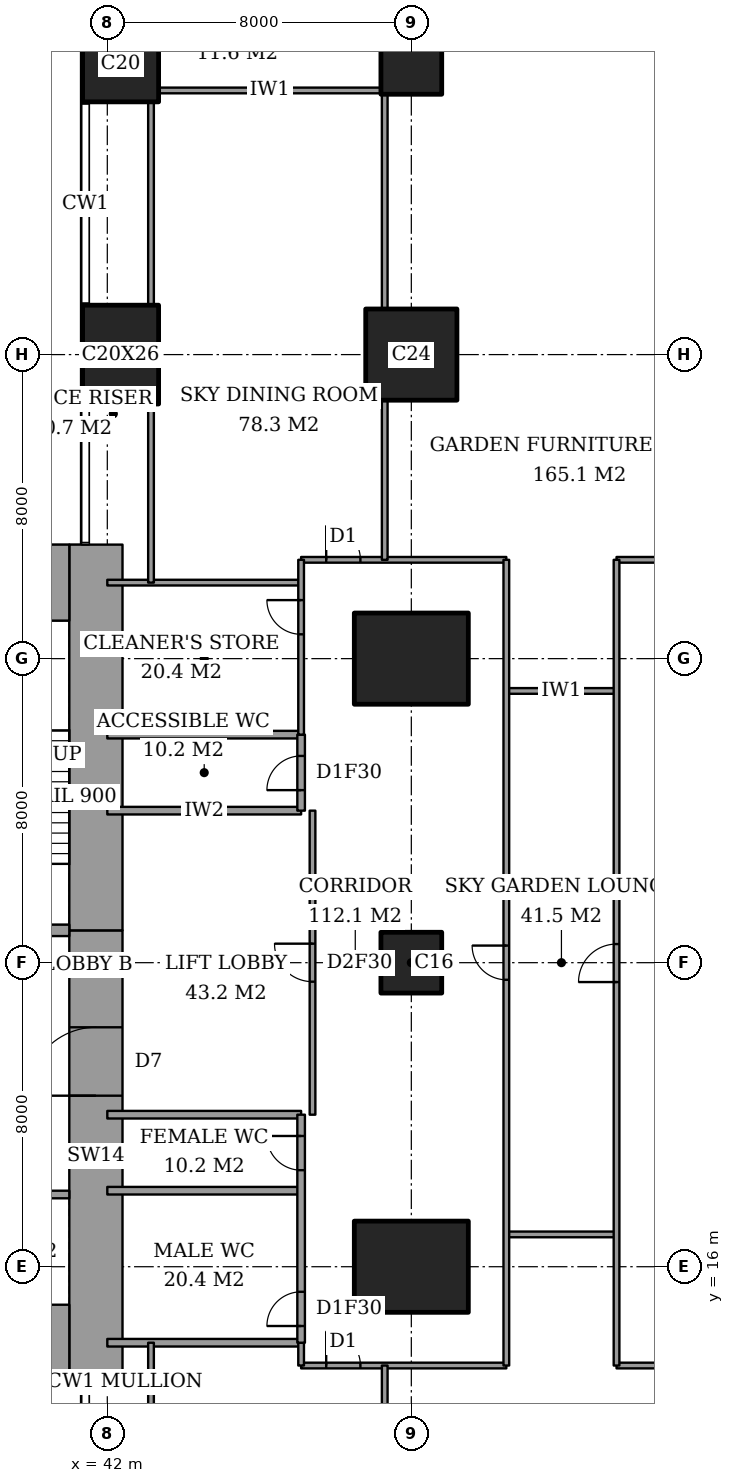
"""IFC4 building model, lengths in metres.
Left out: names, types, materials, properties, quantities, classifications, styles, units other than length and angle.
Written with IfcOpenShell. Run it as: python <this file> out.ifc"""

import sys

from ifc_helpers import new_model, si_unit, direction, frame, frame_2d, origin, origin_2d, place, context, subcontext, project, spatial, rectangle, extrude, element, fill, save


model = new_model("IFC4")
c1 = context("Model", 3, precision=1e-05, world=origin(), true_north=direction((0.0, 1.0)))
c2 = subcontext(c1, "Body", "Model", "MODEL_VIEW")
j1 = project(units=[si_unit("LENGTHUNIT", "METRE"), si_unit("PLANEANGLEUNIT", "RADIAN")], contexts=[c1])
p1 = place(None, origin())
s1 = spatial("IfcSite", under=j1, at=p1, CompositionType="ELEMENT")
p2 = place(p1, origin())
s2 = spatial("IfcBuilding", under=s1, at=p2, CompositionType="ELEMENT")
p3 = place(p2, frame((0.0, 0.0, 225.4)))
s3 = spatial("IfcBuildingStorey", under=s2, at=p3, CompositionType="ELEMENT", Elevation=225.4)
p4 = place(p3, frame((42.35, 40.0, 0.0), z_axis=(0.0, 0.0, 1.0), x_axis=(1.0, 0.0, 0.0)))
e1 = element("IfcColumn", 1, at=p4, inside=s3, PredefinedType="COLUMN", context=c2, shape_type="SweptSolid", body=[
    extrude(rectangle(XDim=2.0, YDim=2.6, at=origin_2d()), origin(), (0.0, 0.0, 1.0), 5.0),
])
p5 = place(p3, frame((42.35, 47.65, 0.0), z_axis=(0.0, 0.0, 1.0), x_axis=(1.0, 0.0, 0.0)))
e2 = element("IfcColumn", 2, at=p5, inside=s3, PredefinedType="COLUMN", context=c2, shape_type="SweptSolid", body=[
    extrude(rectangle(XDim=2.0, YDim=2.0, at=origin_2d()), origin(), (0.0, 0.0, 1.0), 5.0),
])
p6 = place(p3, frame((50.0, 16.0, 0.0), z_axis=(0.0, 0.0, 1.0), x_axis=(1.0, 0.0, 0.0)))
e3 = element("IfcColumn", 3, at=p6, inside=s3, PredefinedType="COLUMN", context=c2, shape_type="SweptSolid", body=[
    extrude(rectangle(XDim=3.0, YDim=2.4, at=origin_2d()), origin(), (0.0, 0.0, 1.0), 5.0),
])
p7 = place(p3, frame((50.0, 24.0, 0.0), z_axis=(0.0, 0.0, 1.0), x_axis=(1.0, 0.0, 0.0)))
e4 = element("IfcColumn", 4, at=p7, inside=s3, PredefinedType="COLUMN", context=c2, shape_type="SweptSolid", body=[
    extrude(rectangle(XDim=1.6, YDim=1.6, at=origin_2d()), origin(), (0.0, 0.0, 1.0), 5.0),
])
p8 = place(p3, frame((50.0, 32.0, 0.0), z_axis=(0.0, 0.0, 1.0), x_axis=(1.0, 0.0, 0.0)))
e5 = element("IfcColumn", 5, at=p8, inside=s3, PredefinedType="COLUMN", context=c2, shape_type="SweptSolid", body=[
    extrude(rectangle(XDim=3.0, YDim=2.4, at=origin_2d()), origin(), (0.0, 0.0, 1.0), 5.0),
])
p9 = place(p3, frame((50.0, 40.0, 0.0), z_axis=(0.0, 0.0, 1.0), x_axis=(1.0, 0.0, 0.0)))
e6 = element("IfcColumn", 6, at=p9, inside=s3, PredefinedType="COLUMN", context=c2, shape_type="SweptSolid", body=[
    extrude(rectangle(XDim=2.4, YDim=2.4, at=origin_2d()), origin(), (0.0, 0.0, 1.0), 5.0),
])
p10 = place(p3, frame((50.0, 47.65, 0.0), z_axis=(0.0, 0.0, 1.0), x_axis=(1.0, 0.0, 0.0)))
e7 = element("IfcColumn", 7, at=p10, inside=s3, PredefinedType="COLUMN", context=c2, shape_type="SweptSolid", body=[
    extrude(rectangle(XDim=1.6, YDim=1.6, at=origin_2d()), origin(), (0.0, 0.0, 1.0), 5.0),
])
for number, where, z_axis, x_axis in (
    (8, (37.85, 14.0, 0.0), (0.0, 0.0, 1.0), (1.0, 0.0, 0.0)),
    (9, (37.85, 34.0, 0.0), (0.0, 0.0, 1.0), (1.0, 0.0, 0.0)),
):
    element("IfcWall", number, at=place(p3, frame(where, z_axis=z_axis, x_axis=x_axis)), inside=s3, PredefinedType="SHEAR", context=c2, shape_type="SweptSolid", body=[
        extrude(rectangle(XDim=3.15, YDim=2.0, at=frame_2d((1.575, 0.0))), origin(), (0.0, 0.0, 1.0), 5.0),
    ])
p11 = place(p3, frame((41.7, 13.0, 0.0), z_axis=(0.0, 0.0, 1.0), x_axis=(0.0, 1.0, 0.0)))
e10 = element("IfcWall", 10, at=p11, inside=s3, PredefinedType="SHEAR", context=c2, shape_type="SweptSolid", body=[
    extrude(rectangle(XDim=11.85, YDim=1.4, at=frame_2d((5.925, 0.0))), origin(), (0.0, 0.0, 1.0), 5.0),
])
p12 = place(p11, frame((7.5, 0.0, 0.0)))
e11 = element("IfcOpeningElement", 11, at=p12, cuts=e10, PredefinedType="OPENING", context=c2, shape_type="SweptSolid", body=[
    extrude(rectangle(XDim=1.8, YDim=2.4, at=frame_2d((0.9, 1.2))), frame((0.0, 0.71, 0.0), z_axis=(0.0, -1.0, 0.0), x_axis=(1.0, 0.0, 0.0)), (0.0, 0.0, 1.0), 1.42),
])
p13 = place(p3, frame((41.7, 24.85, 0.0), z_axis=(0.0, 0.0, 1.0), x_axis=(0.0, 1.0, 0.0)))
e12 = element("IfcWall", 12, at=p13, inside=s3, PredefinedType="SHEAR", context=c2, shape_type="SweptSolid", body=[
    extrude(rectangle(XDim=10.15, YDim=1.4, at=frame_2d((5.075, 0.0))), origin(), (0.0, 0.0, 1.0), 5.0),
])
p14 = place(p3, frame((37.85, 24.85, 0.0), z_axis=(0.0, 0.0, 1.0), x_axis=(1.0, 0.0, 0.0)))
e13 = element("IfcWall", 13, at=p14, inside=s3, PredefinedType="SHEAR", context=c2, shape_type="SweptSolid", body=[
    extrude(rectangle(XDim=3.15, YDim=0.3, at=frame_2d((1.575, 0.0))), origin(), (0.0, 0.0, 1.0), 5.0),
])
p15 = place(p14, frame((0.65, 0.0, 0.0)))
e14 = element("IfcOpeningElement", 14, at=p15, cuts=e13, PredefinedType="OPENING", context=c2, shape_type="SweptSolid", body=[
    extrude(rectangle(XDim=1.6, YDim=2.1, at=frame_2d((0.8, 1.05))), frame((0.0, 0.16, 0.0), z_axis=(0.0, -1.0, 0.0), x_axis=(1.0, 0.0, 0.0)), (0.0, 0.0, 1.0), 0.32),
])
p16 = place(p3, frame((47.1, 13.4, 0.0), z_axis=(0.0, 0.0, 1.0), x_axis=(1.0, 0.0, 0.0)))
e15 = element("IfcWall", 15, at=p16, inside=s3, PredefinedType="PARTITIONING", context=c2, shape_type="SweptSolid", body=[
    extrude(rectangle(XDim=5.4, YDim=0.15, at=frame_2d((2.7, 0.0))), origin(), (0.0, 0.0, 1.0), 4.75),
])
p17 = place(p16, frame((0.66, 0.0, 0.0)))
e16 = element("IfcOpeningElement", 16, at=p17, cuts=e15, PredefinedType="OPENING", context=c2, shape_type="SweptSolid", body=[
    extrude(rectangle(XDim=0.9, YDim=2.1, at=frame_2d((0.45, 1.05))), frame((0.0, 0.085, 0.0), z_axis=(0.0, -1.0, 0.0), x_axis=(1.0, 0.0, 0.0)), (0.0, 0.0, 1.0), 0.17),
])
p18 = place(p3, frame((55.4, 13.4, 0.0), z_axis=(0.0, 0.0, 1.0), x_axis=(1.0, 0.0, 0.0)))
e17 = element("IfcWall", 17, at=p18, inside=s3, PredefinedType="PARTITIONING", context=c2, shape_type="SweptSolid", body=[
    extrude(rectangle(XDim=11.161, YDim=0.15, at=frame_2d((5.581, 0.0))), origin(), (0.0, 0.0, 1.0), 4.75),
])
p19 = place(p18, frame((6.88, 0.0, 0.0)))
e18 = element("IfcOpeningElement", 18, at=p19, cuts=e17, PredefinedType="OPENING", context=c2, shape_type="SweptSolid", body=[
    extrude(rectangle(XDim=0.9, YDim=2.1, at=frame_2d((0.45, 1.05))), frame((0.0, 0.085, 0.0), z_axis=(0.0, -1.0, 0.0), x_axis=(1.0, 0.0, 0.0)), (0.0, 0.0, 1.0), 0.17),
])
p20 = place(p3, frame((42.0, 14.0, 0.0), z_axis=(0.0, 0.0, 1.0), x_axis=(1.0, 0.0, 0.0)))
e19 = element("IfcWall", 19, at=p20, inside=s3, PredefinedType="PARTITIONING", context=c2, shape_type="SweptSolid", body=[
    extrude(rectangle(XDim=5.1, YDim=0.2, at=frame_2d((2.55, 0.0))), origin(), (0.0, 0.0, 1.0), 4.75),
])
p21 = place(p3, frame((52.5, 16.85, 0.0), z_axis=(0.0, 0.0, 1.0), x_axis=(1.0, 0.0, 0.0)))
e20 = element("IfcWall", 20, at=p21, inside=s3, PredefinedType="PARTITIONING", context=c2, shape_type="SweptSolid", body=[
    extrude(rectangle(XDim=2.9, YDim=0.15, at=frame_2d((1.45, 0.0))), origin(), (0.0, 0.0, 1.0), 4.75),
])
for number, where, z_axis, x_axis in (
    (21, (42.0, 18.0, 0.0), (0.0, 0.0, 1.0), (1.0, 0.0, 0.0)),
    (22, (42.0, 20.0, 0.0), (0.0, 0.0, 1.0), (1.0, 0.0, 0.0)),
    (23, (42.0, 28.0, 0.0), (0.0, 0.0, 1.0), (1.0, 0.0, 0.0)),
    (24, (42.0, 30.0, 0.0), (0.0, 0.0, 1.0), (1.0, 0.0, 0.0)),
):
    element("IfcWall", number, at=place(p3, frame(where, z_axis=z_axis, x_axis=x_axis)), inside=s3, PredefinedType="PARTITIONING", context=c2, shape_type="SweptSolid", body=[
        extrude(rectangle(XDim=5.1, YDim=0.2, at=frame_2d((2.55, 0.0))), origin(), (0.0, 0.0, 1.0), 4.75),
    ])
p22 = place(p3, frame((52.5, 31.15, 0.0), z_axis=(0.0, 0.0, 1.0), x_axis=(1.0, 0.0, 0.0)))
e25 = element("IfcWall", 25, at=p22, inside=s3, PredefinedType="PARTITIONING", context=c2, shape_type="SweptSolid", body=[
    extrude(rectangle(XDim=2.9, YDim=0.15, at=frame_2d((1.45, 0.0))), origin(), (0.0, 0.0, 1.0), 4.75),
])
p23 = place(p3, frame((42.0, 34.0, 0.0), z_axis=(0.0, 0.0, 1.0), x_axis=(1.0, 0.0, 0.0)))
e26 = element("IfcWall", 26, at=p23, inside=s3, PredefinedType="PARTITIONING", context=c2, shape_type="SweptSolid", body=[
    extrude(rectangle(XDim=5.1, YDim=0.15, at=frame_2d((2.55, 0.0))), origin(), (0.0, 0.0, 1.0), 4.75),
])
p24 = place(p3, frame((47.1, 34.6, 0.0), z_axis=(0.0, 0.0, 1.0), x_axis=(1.0, 0.0, 0.0)))
e27 = element("IfcWall", 27, at=p24, inside=s3, PredefinedType="PARTITIONING", context=c2, shape_type="SweptSolid", body=[
    extrude(rectangle(XDim=5.4, YDim=0.15, at=frame_2d((2.7, 0.0))), origin(), (0.0, 0.0, 1.0), 4.75),
])
p25 = place(p24, frame((0.66, 0.0, 0.0)))
e28 = element("IfcOpeningElement", 28, at=p25, cuts=e27, PredefinedType="OPENING", context=c2, shape_type="SweptSolid", body=[
    extrude(rectangle(XDim=0.9, YDim=2.1, at=frame_2d((0.45, 1.05))), frame((0.0, 0.085, 0.0), z_axis=(0.0, -1.0, 0.0), x_axis=(1.0, 0.0, 0.0)), (0.0, 0.0, 1.0), 0.17),
])
p26 = place(p3, frame((55.4, 34.6, 0.0), z_axis=(0.0, 0.0, 1.0), x_axis=(1.0, 0.0, 0.0)))
e29 = element("IfcWall", 29, at=p26, inside=s3, PredefinedType="PARTITIONING", context=c2, shape_type="SweptSolid", body=[
    extrude(rectangle(XDim=11.161, YDim=0.15, at=frame_2d((5.581, 0.0))), origin(), (0.0, 0.0, 1.0), 4.75),
])
p27 = place(p26, frame((6.88, 0.0, 0.0)))
e30 = element("IfcOpeningElement", 30, at=p27, cuts=e29, PredefinedType="OPENING", context=c2, shape_type="SweptSolid", body=[
    extrude(rectangle(XDim=0.9, YDim=2.1, at=frame_2d((0.45, 1.05))), frame((0.0, 0.085, 0.0), z_axis=(0.0, -1.0, 0.0), x_axis=(1.0, 0.0, 0.0)), (0.0, 0.0, 1.0), 0.17),
])
p28 = place(p3, frame((43.35, 46.95, 0.0), z_axis=(0.0, 0.0, 1.0), x_axis=(1.0, 0.0, 0.0)))
e31 = element("IfcWall", 31, at=p28, inside=s3, PredefinedType="PARTITIONING", context=c2, shape_type="SweptSolid", body=[
    extrude(rectangle(XDim=5.85, YDim=0.15, at=frame_2d((2.925, 0.0))), origin(), (0.0, 0.0, 1.0), 4.75),
])
for number, where, z_axis, x_axis in (
    (32, (43.15, 9.3, 0.0), (0.0, 0.0, 1.0), (0.0, 1.0, 0.0)),
    (33, (43.15, 34.0, 0.0), (0.0, 0.0, 1.0), (0.0, 1.0, 0.0)),
):
    element("IfcWall", number, at=place(p3, frame(where, z_axis=z_axis, x_axis=x_axis)), inside=s3, PredefinedType="PARTITIONING", context=c2, shape_type="SweptSolid", body=[
        extrude(rectangle(XDim=4.7, YDim=0.15, at=frame_2d((2.35, 0.0))), origin(), (0.0, 0.0, 1.0), 4.75),
    ])
p29 = place(p3, frame((43.15, 41.3, 0.0), z_axis=(0.0, 0.0, 1.0), x_axis=(0.0, 1.0, 0.0)))
e34 = element("IfcWall", 34, at=p29, inside=s3, PredefinedType="PARTITIONING", context=c2, shape_type="SweptSolid", body=[
    extrude(rectangle(XDim=5.35, YDim=0.15, at=frame_2d((2.675, 0.0))), origin(), (0.0, 0.0, 1.0), 4.75),
])
p30 = place(p3, frame((47.1, 14.0, 0.0), z_axis=(0.0, 0.0, 1.0), x_axis=(0.0, 1.0, 0.0)))
e35 = element("IfcWall", 35, at=p30, inside=s3, PredefinedType="PARTITIONING", context=c2, shape_type="SweptSolid", body=[
    extrude(rectangle(XDim=6.0, YDim=0.2, at=frame_2d((3.0, 0.0))), origin(), (0.0, 0.0, 1.0), 4.75),
])
p31 = place(p30, frame((0.44, 0.0, 0.0)))
e36 = element("IfcOpeningElement", 36, at=p31, cuts=e35, PredefinedType="OPENING", context=c2, shape_type="SweptSolid", body=[
    extrude(rectangle(XDim=0.9, YDim=2.1, at=frame_2d((0.45, 1.05))), frame((0.0, 0.11, 0.0), z_axis=(0.0, -1.0, 0.0), x_axis=(1.0, 0.0, 0.0)), (0.0, 0.0, 1.0), 0.22),
])
p32 = place(p30, frame((4.54, 0.0, 0.0)))
e37 = element("IfcOpeningElement", 37, at=p32, cuts=e35, PredefinedType="OPENING", context=c2, shape_type="SweptSolid", body=[
    extrude(rectangle(XDim=0.9, YDim=2.1, at=frame_2d((0.45, 1.05))), frame((0.0, 0.11, 0.0), z_axis=(0.0, -1.0, 0.0), x_axis=(1.0, 0.0, 0.0)), (0.0, 0.0, 1.0), 0.22),
])
p33 = place(p3, frame((47.1, 28.0, 0.0), z_axis=(0.0, 0.0, 1.0), x_axis=(0.0, 1.0, 0.0)))
e38 = element("IfcWall", 38, at=p33, inside=s3, PredefinedType="PARTITIONING", context=c2, shape_type="SweptSolid", body=[
    extrude(rectangle(XDim=2.0, YDim=0.2, at=frame_2d((1.0, 0.0))), origin(), (0.0, 0.0, 1.0), 4.75),
])
p34 = place(p33, frame((0.54, 0.0, 0.0)))
e39 = element("IfcOpeningElement", 39, at=p34, cuts=e38, PredefinedType="OPENING", context=c2, shape_type="SweptSolid", body=[
    extrude(rectangle(XDim=0.9, YDim=2.1, at=frame_2d((0.45, 1.05))), frame((0.0, 0.11, 0.0), z_axis=(0.0, -1.0, 0.0), x_axis=(1.0, 0.0, 0.0)), (0.0, 0.0, 1.0), 0.22),
])
p35 = place(p3, frame((47.1, 13.4, 0.0), z_axis=(0.0, 0.0, 1.0), x_axis=(0.0, 1.0, 0.0)))
e40 = element("IfcWall", 40, at=p35, inside=s3, PredefinedType="PARTITIONING", context=c2, shape_type="SweptSolid", body=[
    extrude(rectangle(XDim=0.6, YDim=0.15, at=frame_2d((0.3, 0.0))), origin(), (0.0, 0.0, 1.0), 4.75),
])
p36 = place(p3, frame((47.1, 30.0, 0.0), z_axis=(0.0, 0.0, 1.0), x_axis=(0.0, 1.0, 0.0)))
e41 = element("IfcWall", 41, at=p36, inside=s3, PredefinedType="PARTITIONING", context=c2, shape_type="SweptSolid", body=[
    extrude(rectangle(XDim=4.6, YDim=0.15, at=frame_2d((2.3, 0.0))), origin(), (0.0, 0.0, 1.0), 4.75),
])
p37 = place(p36, frame((2.64, 0.0, 0.0)))
e42 = element("IfcOpeningElement", 42, at=p37, cuts=e41, PredefinedType="OPENING", context=c2, shape_type="SweptSolid", body=[
    extrude(rectangle(XDim=0.9, YDim=2.1, at=frame_2d((0.45, 1.05))), frame((0.0, 0.085, 0.0), z_axis=(0.0, -1.0, 0.0), x_axis=(1.0, 0.0, 0.0)), (0.0, 0.0, 1.0), 0.17),
])
p38 = place(p3, frame((47.4, 20.0, 0.0), z_axis=(0.0, 0.0, 1.0), x_axis=(0.0, 1.0, 0.0)))
e43 = element("IfcWall", 43, at=p38, inside=s3, PredefinedType="PARTITIONING", context=c2, shape_type="SweptSolid", body=[
    extrude(rectangle(XDim=8.0, YDim=0.15, at=frame_2d((4.0, 0.0))), origin(), (0.0, 0.0, 1.0), 4.75),
])
p39 = place(p38, frame((3.5, 0.0, 0.0)))
e44 = element("IfcOpeningElement", 44, at=p39, cuts=e43, PredefinedType="OPENING", context=c2, shape_type="SweptSolid", body=[
    extrude(rectangle(XDim=1.0, YDim=2.1, at=frame_2d((0.5, 1.05))), frame((0.0, 0.085, 0.0), z_axis=(0.0, -1.0, 0.0), x_axis=(1.0, 0.0, 0.0)), (0.0, 0.0, 1.0), 0.17),
])
for number, where, z_axis, x_axis in (
    (45, (49.3, 9.2, 0.0), (0.0, 0.0, 1.0), (0.0, 1.0, 0.0)),
    (46, (49.3, 34.6, 0.0), (0.0, 0.0, 1.0), (0.0, 1.0, 0.0)),
):
    element("IfcWall", number, at=place(p3, frame(where, z_axis=z_axis, x_axis=x_axis)), inside=s3, PredefinedType="PARTITIONING", context=c2, shape_type="SweptSolid", body=[
        extrude(rectangle(XDim=4.2, YDim=0.15, at=frame_2d((2.1, 0.0))), origin(), (0.0, 0.0, 1.0), 4.75),
    ])
p40 = place(p3, frame((49.3, 41.2, 0.0), z_axis=(0.0, 0.0, 1.0), x_axis=(0.0, 1.0, 0.0)))
e47 = element("IfcWall", 47, at=p40, inside=s3, PredefinedType="PARTITIONING", context=c2, shape_type="SweptSolid", body=[
    extrude(rectangle(XDim=5.65, YDim=0.15, at=frame_2d((2.825, 0.0))), origin(), (0.0, 0.0, 1.0), 4.75),
])
p41 = place(p3, frame((52.5, 13.4, 0.0), z_axis=(0.0, 0.0, 1.0), x_axis=(0.0, 1.0, 0.0)))
e48 = element("IfcWall", 48, at=p41, inside=s3, PredefinedType="PARTITIONING", context=c2, shape_type="SweptSolid", body=[
    extrude(rectangle(XDim=21.2, YDim=0.15, at=frame_2d((10.6, 0.0))), origin(), (0.0, 0.0, 1.0), 4.75),
])
p42 = place(p41, frame((10.15, 0.0, 0.0)))
e49 = element("IfcOpeningElement", 49, at=p42, cuts=e48, PredefinedType="OPENING", context=c2, shape_type="SweptSolid", body=[
    extrude(rectangle(XDim=0.9, YDim=2.1, at=frame_2d((0.45, 1.05))), frame((0.0, 0.085, 0.0), z_axis=(0.0, -1.0, 0.0), x_axis=(1.0, 0.0, 0.0)), (0.0, 0.0, 1.0), 0.17),
])
p43 = place(p3, frame((55.4, 13.4, 0.0), z_axis=(0.0, 0.0, 1.0), x_axis=(0.0, 1.0, 0.0)))
e50 = element("IfcWall", 50, at=p43, inside=s3, PredefinedType="PARTITIONING", context=c2, shape_type="SweptSolid", body=[
    extrude(rectangle(XDim=21.2, YDim=0.15, at=frame_2d((10.6, 0.0))), origin(), (0.0, 0.0, 1.0), 4.75),
])
p44 = place(p43, frame((10.09, 0.0, 0.0)))
e51 = element("IfcOpeningElement", 51, at=p44, cuts=e50, PredefinedType="OPENING", context=c2, shape_type="SweptSolid", body=[
    extrude(rectangle(XDim=1.0, YDim=2.1, at=frame_2d((0.5, 1.05))), frame((0.0, 0.085, 0.0), z_axis=(0.0, -1.0, 0.0), x_axis=(1.0, 0.0, 0.0)), (0.0, 0.0, 1.0), 0.17),
])
p45 = place(p3, frame((28.3, 17.9, 0.0), z_axis=(0.0, 0.0, 1.0), x_axis=(1.0, 0.0, 0.0)))
e52 = element("IfcWall", 52, at=p45, inside=s3, PredefinedType="PARTITIONING", context=c2, shape_type="SweptSolid", body=[
    extrude(rectangle(XDim=12.7, YDim=0.2, at=frame_2d((6.35, 0.0))), origin(), (0.0, 0.0, 1.0), 5.0),
])
p46 = place(p45, frame((1.05, 0.0, 0.0)))
e53 = element("IfcOpeningElement", 53, at=p46, cuts=e52, PredefinedType="OPENING", context=c2, shape_type="SweptSolid", body=[
    extrude(rectangle(XDim=0.9, YDim=2.1, at=frame_2d((0.45, 1.05))), frame((0.0, 0.11, 0.0), z_axis=(0.0, -1.0, 0.0), x_axis=(1.0, 0.0, 0.0)), (0.0, 0.0, 1.0), 0.22),
])
p47 = place(p45, frame((7.4, 0.0, 0.0)))
e54 = element("IfcOpeningElement", 54, at=p47, cuts=e52, PredefinedType="OPENING", context=c2, shape_type="SweptSolid", body=[
    extrude(rectangle(XDim=1.0, YDim=2.1, at=frame_2d((0.5, 1.05))), frame((0.0, 0.11, 0.0), z_axis=(0.0, -1.0, 0.0), x_axis=(1.0, 0.0, 0.0)), (0.0, 0.0, 1.0), 0.22),
])
p48 = place(p45, frame((10.6, 0.0, 0.0)))
e55 = element("IfcOpeningElement", 55, at=p48, cuts=e52, PredefinedType="OPENING", context=c2, shape_type="SweptSolid", body=[
    extrude(rectangle(XDim=1.2, YDim=2.1, at=frame_2d((0.6, 1.05))), frame((0.0, 0.11, 0.0), z_axis=(0.0, -1.0, 0.0), x_axis=(1.0, 0.0, 0.0)), (0.0, 0.0, 1.0), 0.22),
])
p49 = place(p44, origin())
e56 = element("IfcDoor", 56, at=p49, inside=s3, OperationType="SINGLE_SWING_RIGHT", PredefinedType="DOOR", context=c2, shape_type="SweptSolid", body=[
    extrude(rectangle(XDim=1.0, YDim=2.1, at=frame_2d((0.5, 1.05))), frame((0.0, 0.025, 0.0), z_axis=(0.0, -1.0, 0.0), x_axis=(1.0, 0.0, 0.0)), (0.0, 0.0, 1.0), 0.05),
])
fill(e51, e56)
p50 = place(p42, origin())
e57 = element("IfcDoor", 57, at=p50, inside=s3, OperationType="SINGLE_SWING_LEFT", PredefinedType="DOOR", context=c2, shape_type="SweptSolid", body=[
    extrude(rectangle(XDim=0.9, YDim=2.1, at=frame_2d((0.45, 1.05))), frame((0.0, 0.025, 0.0), z_axis=(0.0, -1.0, 0.0), x_axis=(1.0, 0.0, 0.0)), (0.0, 0.0, 1.0), 0.05),
])
fill(e49, e57)
p51 = place(p39, origin())
e58 = element("IfcDoor", 58, at=p51, inside=s3, OperationType="SINGLE_SWING_LEFT", PredefinedType="DOOR", context=c2, shape_type="SweptSolid", body=[
    extrude(rectangle(XDim=1.0, YDim=2.1, at=frame_2d((0.5, 1.05))), frame((0.0, 0.025, 0.0), z_axis=(0.0, -1.0, 0.0), x_axis=(1.0, 0.0, 0.0)), (0.0, 0.0, 1.0), 0.05),
])
fill(e44, e58)
p52 = place(p31, origin())
e59 = element("IfcDoor", 59, at=p52, inside=s3, OperationType="SINGLE_SWING_RIGHT", PredefinedType="DOOR", context=c2, shape_type="SweptSolid", body=[
    extrude(rectangle(XDim=0.9, YDim=2.1, at=frame_2d((0.45, 1.05))), frame((0.0, 0.025, 0.0), z_axis=(0.0, -1.0, 0.0), x_axis=(1.0, 0.0, 0.0)), (0.0, 0.0, 1.0), 0.05),
])
fill(e36, e59)
p53 = place(p32, origin())
e60 = element("IfcDoor", 60, at=p53, inside=s3, OperationType="SINGLE_SWING_LEFT", PredefinedType="DOOR", context=c2, shape_type="SweptSolid", body=[
    extrude(rectangle(XDim=0.9, YDim=2.1, at=frame_2d((0.45, 1.05))), frame((0.0, 0.025, 0.0), z_axis=(0.0, -1.0, 0.0), x_axis=(1.0, 0.0, 0.0)), (0.0, 0.0, 1.0), 0.05),
])
fill(e37, e60)
p54 = place(p34, origin())
e61 = element("IfcDoor", 61, at=p54, inside=s3, OperationType="SINGLE_SWING_RIGHT", PredefinedType="DOOR", context=c2, shape_type="SweptSolid", body=[
    extrude(rectangle(XDim=0.9, YDim=2.1, at=frame_2d((0.45, 1.05))), frame((0.0, 0.025, 0.0), z_axis=(0.0, -1.0, 0.0), x_axis=(1.0, 0.0, 0.0)), (0.0, 0.0, 1.0), 0.05),
])
fill(e39, e61)
p55 = place(p37, origin())
e62 = element("IfcDoor", 62, at=p55, inside=s3, OperationType="SINGLE_SWING_LEFT", PredefinedType="DOOR", context=c2, shape_type="SweptSolid", body=[
    extrude(rectangle(XDim=0.9, YDim=2.1, at=frame_2d((0.45, 1.05))), frame((0.0, 0.025, 0.0), z_axis=(0.0, -1.0, 0.0), x_axis=(1.0, 0.0, 0.0)), (0.0, 0.0, 1.0), 0.05),
])
fill(e42, e62)
p56 = place(p17, origin())
e63 = element("IfcDoor", 63, at=p56, inside=s3, OperationType="SINGLE_SWING_RIGHT", PredefinedType="DOOR", context=c2, shape_type="SweptSolid", body=[
    extrude(rectangle(XDim=0.9, YDim=2.1, at=frame_2d((0.45, 1.05))), frame((0.0, 0.025, 0.0), z_axis=(0.0, -1.0, 0.0), x_axis=(1.0, 0.0, 0.0)), (0.0, 0.0, 1.0), 0.05),
])
fill(e16, e63)
p57 = place(p25, origin())
e64 = element("IfcDoor", 64, at=p57, inside=s3, OperationType="SINGLE_SWING_RIGHT", PredefinedType="DOOR", context=c2, shape_type="SweptSolid", body=[
    extrude(rectangle(XDim=0.9, YDim=2.1, at=frame_2d((0.45, 1.05))), frame((0.0, 0.025, 0.0), z_axis=(0.0, -1.0, 0.0), x_axis=(1.0, 0.0, 0.0)), (0.0, 0.0, 1.0), 0.05),
])
fill(e28, e64)
p58 = place(p12, origin())
e65 = element("IfcDoor", 65, at=p58, inside=s3, OperationType="DOUBLE_DOOR_DOUBLE_SWING", PredefinedType="DOOR", context=c2, shape_type="SweptSolid", body=[
    extrude(rectangle(XDim=1.8, YDim=2.4, at=frame_2d((0.9, 1.2))), frame((0.0, 0.025, 0.0), z_axis=(0.0, -1.0, 0.0), x_axis=(1.0, 0.0, 0.0)), (0.0, 0.0, 1.0), 0.05),
])
fill(e11, e65)
save(model, sys.argv[1])
